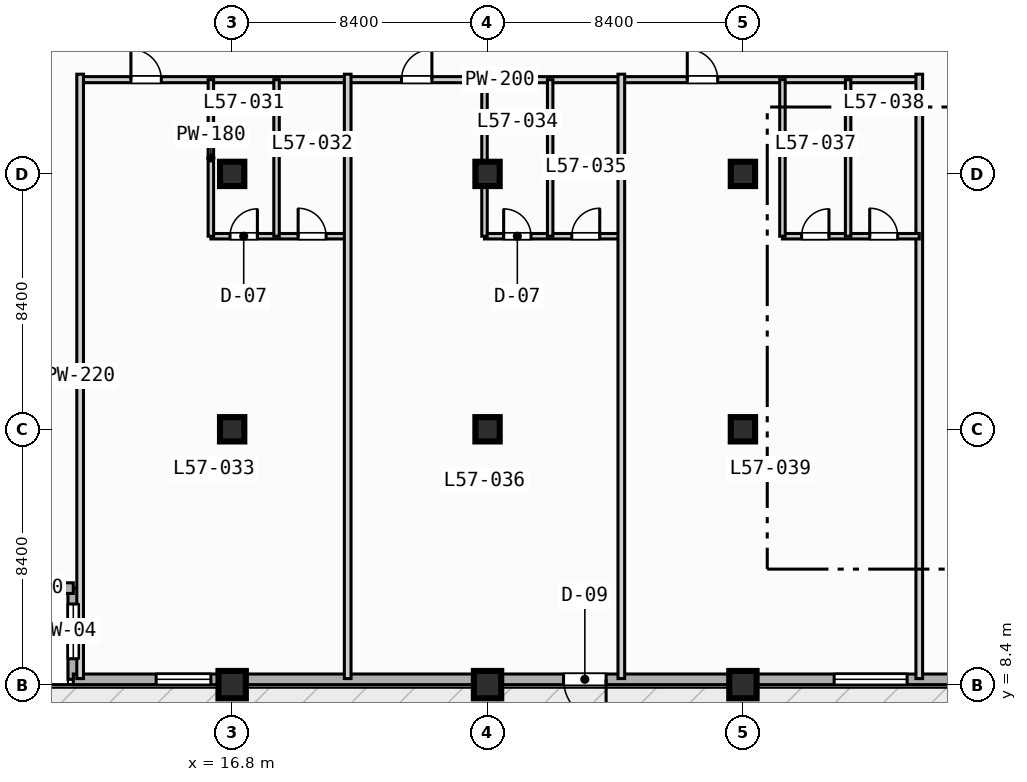
"""IFC4 building model, lengths in metres.
Left out: names, types, materials, properties, quantities, classifications, styles, units other than length and angle.
Written with IfcOpenShell. Run it as: python <this file> out.ifc"""

import sys

from ifc_helpers import new_model, si_unit, direction, frame, frame_2d, origin, origin_2d, place, context, subcontext, project, spatial, rectangle, extrude, element, fill, save


model = new_model("IFC4")
c1 = context("Model", 3, precision=1e-05, world=origin(), true_north=direction((0.0, 1.0)))
c2 = subcontext(c1, "Body", "Model", "MODEL_VIEW")
j1 = project(units=[si_unit("LENGTHUNIT", "METRE"), si_unit("PLANEANGLEUNIT", "RADIAN")], contexts=[c1])
p1 = place(None, origin())
s1 = spatial("IfcSite", under=j1, at=p1, CompositionType="ELEMENT")
p2 = place(p1, origin())
s2 = spatial("IfcBuilding", under=s1, at=p2, CompositionType="ELEMENT")
p3 = place(p2, frame((0.0, 0.0, 234.2)))
s3 = spatial("IfcBuildingStorey", under=s2, at=p3, CompositionType="ELEMENT", Elevation=234.2)
p4 = place(p3, frame((16.8, 8.4, 0.0), z_axis=(0.0, 0.0, 1.0), x_axis=(1.0, 0.0, 0.0)))
e1 = element("IfcColumn", 1, at=p4, inside=s3, PredefinedType="COLUMN", context=c2, shape_type="SweptSolid", body=[
    extrude(rectangle(XDim=0.9, YDim=0.9, at=origin_2d()), origin(), (0.0, 0.0, 1.0), 3.7),
])
for number, where, z_axis, x_axis in (
    (2, (16.8, 16.8, 0.0), (0.0, 0.0, 1.0), (1.0, 0.0, 0.0)),
    (3, (16.8, 25.2, 0.0), (0.0, 0.0, 1.0), (1.0, 0.0, 0.0)),
):
    element("IfcColumn", number, at=place(p3, frame(where, z_axis=z_axis, x_axis=x_axis)), inside=s3, PredefinedType="COLUMN", context=c2, shape_type="SweptSolid", body=[
        extrude(rectangle(XDim=0.8, YDim=0.8, at=origin_2d()), origin(), (0.0, 0.0, 1.0), 3.7),
    ])
p5 = place(p3, frame((25.2, 8.4, 0.0), z_axis=(0.0, 0.0, 1.0), x_axis=(1.0, 0.0, 0.0)))
e4 = element("IfcColumn", 4, at=p5, inside=s3, PredefinedType="COLUMN", context=c2, shape_type="SweptSolid", body=[
    extrude(rectangle(XDim=0.9, YDim=0.9, at=origin_2d()), origin(), (0.0, 0.0, 1.0), 3.7),
])
for number, where, z_axis, x_axis in (
    (5, (25.2, 16.8, 0.0), (0.0, 0.0, 1.0), (1.0, 0.0, 0.0)),
    (6, (25.2, 25.2, 0.0), (0.0, 0.0, 1.0), (1.0, 0.0, 0.0)),
):
    element("IfcColumn", number, at=place(p3, frame(where, z_axis=z_axis, x_axis=x_axis)), inside=s3, PredefinedType="COLUMN", context=c2, shape_type="SweptSolid", body=[
        extrude(rectangle(XDim=0.8, YDim=0.8, at=origin_2d()), origin(), (0.0, 0.0, 1.0), 3.7),
    ])
p6 = place(p3, frame((33.6, 8.4, 0.0), z_axis=(0.0, 0.0, 1.0), x_axis=(1.0, 0.0, 0.0)))
e7 = element("IfcColumn", 7, at=p6, inside=s3, PredefinedType="COLUMN", context=c2, shape_type="SweptSolid", body=[
    extrude(rectangle(XDim=0.9, YDim=0.9, at=origin_2d()), origin(), (0.0, 0.0, 1.0), 3.7),
])
for number, where, z_axis, x_axis in (
    (8, (33.6, 16.8, 0.0), (0.0, 0.0, 1.0), (1.0, 0.0, 0.0)),
    (9, (33.6, 25.2, 0.0), (0.0, 0.0, 1.0), (1.0, 0.0, 0.0)),
):
    element("IfcColumn", number, at=place(p3, frame(where, z_axis=z_axis, x_axis=x_axis)), inside=s3, PredefinedType="COLUMN", context=c2, shape_type="SweptSolid", body=[
        extrude(rectangle(XDim=0.8, YDim=0.8, at=origin_2d()), origin(), (0.0, 0.0, 1.0), 3.7),
    ])
p7 = place(p3, frame((11.575, 8.575, 0.0), z_axis=(0.0, 0.0, 1.0), x_axis=(0.0, 1.0, 0.0)))
e10 = element("IfcWall", 10, at=p7, inside=s3, PredefinedType="STANDARD", context=c2, shape_type="SweptSolid", body=[
    extrude(rectangle(XDim=3.0, YDim=0.35, at=frame_2d((1.5, 0.0))), origin(), (0.0, 0.0, 1.0), 3.47),
])
p8 = place(p7, frame((0.677, 0.0, 0.85)))
e11 = element("IfcOpeningElement", 11, at=p8, cuts=e10, PredefinedType="OPENING", context=c2, shape_type="SweptSolid", body=[
    extrude(rectangle(XDim=1.8, YDim=1.8, at=frame_2d((0.9, 0.9))), frame((0.0, 0.185, 0.0), z_axis=(0.0, -1.0, 0.0), x_axis=(1.0, 0.0, 0.0)), (0.0, 0.0, 1.0), 0.37),
])
p9 = place(p3, frame((11.575, 11.575, 0.0), z_axis=(0.0, 0.0, 1.0), x_axis=(-1.0, 0.0, 0.0)))
e12 = element("IfcWall", 12, at=p9, inside=s3, PredefinedType="STANDARD", context=c2, shape_type="SweptSolid", body=[
    extrude(rectangle(XDim=3.0, YDim=0.35, at=frame_2d((1.5, 0.0))), origin(), (0.0, 0.0, 1.0), 3.47),
])
p10 = place(p3, frame((72.425, 8.575, 0.0), z_axis=(0.0, 0.0, 1.0), x_axis=(-1.0, 0.0, 0.0)))
e13 = element("IfcWall", 13, at=p10, inside=s3, PredefinedType="STANDARD", context=c2, shape_type="SweptSolid", body=[
    extrude(rectangle(XDim=60.85, YDim=0.35, at=frame_2d((30.425, 0.0))), origin(), (0.0, 0.0, 1.0), 3.47),
])
p11 = place(p10, frame((43.325, 0.0, 0.0)))
e14 = element("IfcOpeningElement", 14, at=p11, cuts=e13, PredefinedType="OPENING", context=c2, shape_type="SweptSolid", body=[
    extrude(rectangle(XDim=1.4, YDim=2.2, at=frame_2d((0.7, 1.1))), frame((0.0, 0.185, 0.0), z_axis=(0.0, -1.0, 0.0), x_axis=(1.0, 0.0, 0.0)), (0.0, 0.0, 1.0), 0.37),
])
p12 = place(p10, frame((33.425, 0.0, 0.85)))
e15 = element("IfcOpeningElement", 15, at=p12, cuts=e13, PredefinedType="OPENING", context=c2, shape_type="SweptSolid", body=[
    extrude(rectangle(XDim=2.4, YDim=1.95, at=frame_2d((1.2, 0.975))), frame((0.0, 0.185, 0.0), z_axis=(0.0, -1.0, 0.0), x_axis=(1.0, 0.0, 0.0)), (0.0, 0.0, 1.0), 0.37),
])
p13 = place(p10, frame((25.325, 0.0, 0.85)))
e16 = element("IfcOpeningElement", 16, at=p13, cuts=e13, PredefinedType="OPENING", context=c2, shape_type="SweptSolid", body=[
    extrude(rectangle(XDim=1.8, YDim=1.8, at=frame_2d((0.9, 0.9))), frame((0.0, 0.185, 0.0), z_axis=(0.0, -1.0, 0.0), x_axis=(1.0, 0.0, 0.0)), (0.0, 0.0, 1.0), 0.37),
])
p14 = place(p10, frame((56.325, 0.0, 0.85)))
e17 = element("IfcOpeningElement", 17, at=p14, cuts=e13, PredefinedType="OPENING", context=c2, shape_type="SweptSolid", body=[
    extrude(rectangle(XDim=1.8, YDim=1.8, at=frame_2d((0.9, 0.9))), frame((0.0, 0.185, 0.0), z_axis=(0.0, -1.0, 0.0), x_axis=(1.0, 0.0, 0.0)), (0.0, 0.0, 1.0), 0.37),
])
p15 = place(p3, frame((11.8, 28.3, 0.0), z_axis=(0.0, 0.0, 1.0), x_axis=(1.0, 0.0, 0.0)))
e18 = element("IfcWall", 18, at=p15, inside=s3, PredefinedType="PARTITIONING", context=c2, shape_type="SweptSolid", body=[
    extrude(rectangle(XDim=27.6, YDim=0.2, at=frame_2d((13.8, 0.0))), origin(), (0.0, 0.0, 1.0), 3.47),
])
p16 = place(p15, frame((1.67, 0.0, 0.0)))
e19 = element("IfcOpeningElement", 19, at=p16, cuts=e18, PredefinedType="OPENING", context=c2, shape_type="SweptSolid", body=[
    extrude(rectangle(XDim=1.0, YDim=2.15, at=frame_2d((0.5, 1.075))), frame((0.0, 0.11, 0.0), z_axis=(0.0, -1.0, 0.0), x_axis=(1.0, 0.0, 0.0)), (0.0, 0.0, 1.0), 0.22),
])
p17 = place(p15, frame((10.57, 0.0, 0.0)))
e20 = element("IfcOpeningElement", 20, at=p17, cuts=e18, PredefinedType="OPENING", context=c2, shape_type="SweptSolid", body=[
    extrude(rectangle(XDim=1.0, YDim=2.15, at=frame_2d((0.5, 1.075))), frame((0.0, 0.11, 0.0), z_axis=(0.0, -1.0, 0.0), x_axis=(1.0, 0.0, 0.0)), (0.0, 0.0, 1.0), 0.22),
])
p18 = place(p15, frame((19.97, 0.0, 0.0)))
e21 = element("IfcOpeningElement", 21, at=p18, cuts=e18, PredefinedType="OPENING", context=c2, shape_type="SweptSolid", body=[
    extrude(rectangle(XDim=1.0, YDim=2.15, at=frame_2d((0.5, 1.075))), frame((0.0, 0.11, 0.0), z_axis=(0.0, -1.0, 0.0), x_axis=(1.0, 0.0, 0.0)), (0.0, 0.0, 1.0), 0.22),
])
p19 = place(p3, frame((11.8, 8.6, 0.0), z_axis=(0.0, 0.0, 1.0), x_axis=(0.0, 1.0, 0.0)))
e22 = element("IfcWall", 22, at=p19, inside=s3, PredefinedType="PARTITIONING", context=c2, shape_type="SweptSolid", body=[
    extrude(rectangle(XDim=19.88, YDim=0.22, at=frame_2d((9.94, 0.0))), origin(), (0.0, 0.0, 1.0), 3.47),
])
p20 = place(p3, frame((16.1, 23.15, 0.0), z_axis=(0.0, 0.0, 1.0), x_axis=(1.0, 0.0, 0.0)))
e23 = element("IfcWall", 23, at=p20, inside=s3, PredefinedType="PLUMBINGWALL", context=c2, shape_type="SweptSolid", body=[
    extrude(rectangle(XDim=4.5, YDim=0.18, at=frame_2d((2.25, 0.0))), origin(), (0.0, 0.0, 1.0), 3.47),
])
p21 = place(p20, frame((0.63, 0.0, 0.0)))
e24 = element("IfcOpeningElement", 24, at=p21, cuts=e23, PredefinedType="OPENING", context=c2, shape_type="SweptSolid", body=[
    extrude(rectangle(XDim=0.9, YDim=2.1, at=frame_2d((0.45, 1.05))), frame((0.0, 0.1, 0.0), z_axis=(0.0, -1.0, 0.0), x_axis=(1.0, 0.0, 0.0)), (0.0, 0.0, 1.0), 0.2),
])
p22 = place(p20, frame((2.87, 0.0, 0.0)))
e25 = element("IfcOpeningElement", 25, at=p22, cuts=e23, PredefinedType="OPENING", context=c2, shape_type="SweptSolid", body=[
    extrude(rectangle(XDim=0.92, YDim=2.1, at=frame_2d((0.46, 1.05))), frame((0.0, 0.1, 0.0), z_axis=(0.0, -1.0, 0.0), x_axis=(1.0, 0.0, 0.0)), (0.0, 0.0, 1.0), 0.2),
])
for number, where, z_axis, x_axis in (
    (26, (16.1, 23.15, 0.0), (0.0, 0.0, 1.0), (0.0, 1.0, 0.0)),
    (27, (18.26, 23.15, 0.0), (0.0, 0.0, 1.0), (0.0, 1.0, 0.0)),
):
    element("IfcWall", number, at=place(p3, frame(where, z_axis=z_axis, x_axis=x_axis)), inside=s3, PredefinedType="PLUMBINGWALL", context=c2, shape_type="SweptSolid", body=[
        extrude(rectangle(XDim=5.15, YDim=0.18, at=frame_2d((2.575, 0.0))), origin(), (0.0, 0.0, 1.0), 3.47),
    ])
p23 = place(p3, frame((20.6, 8.6, 0.0), z_axis=(0.0, 0.0, 1.0), x_axis=(0.0, 1.0, 0.0)))
e28 = element("IfcWall", 28, at=p23, inside=s3, PredefinedType="PARTITIONING", context=c2, shape_type="SweptSolid", body=[
    extrude(rectangle(XDim=19.88, YDim=0.22, at=frame_2d((9.94, 0.0))), origin(), (0.0, 0.0, 1.0), 3.47),
])
p24 = place(p3, frame((25.1, 23.15, 0.0), z_axis=(0.0, 0.0, 1.0), x_axis=(1.0, 0.0, 0.0)))
e29 = element("IfcWall", 29, at=p24, inside=s3, PredefinedType="PLUMBINGWALL", context=c2, shape_type="SweptSolid", body=[
    extrude(rectangle(XDim=4.5, YDim=0.18, at=frame_2d((2.25, 0.0))), origin(), (0.0, 0.0, 1.0), 3.47),
])
p25 = place(p24, frame((0.63, 0.0, 0.0)))
e30 = element("IfcOpeningElement", 30, at=p25, cuts=e29, PredefinedType="OPENING", context=c2, shape_type="SweptSolid", body=[
    extrude(rectangle(XDim=0.9, YDim=2.1, at=frame_2d((0.45, 1.05))), frame((0.0, 0.1, 0.0), z_axis=(0.0, -1.0, 0.0), x_axis=(1.0, 0.0, 0.0)), (0.0, 0.0, 1.0), 0.2),
])
p26 = place(p24, frame((2.87, 0.0, 0.0)))
e31 = element("IfcOpeningElement", 31, at=p26, cuts=e29, PredefinedType="OPENING", context=c2, shape_type="SweptSolid", body=[
    extrude(rectangle(XDim=0.92, YDim=2.1, at=frame_2d((0.46, 1.05))), frame((0.0, 0.1, 0.0), z_axis=(0.0, -1.0, 0.0), x_axis=(1.0, 0.0, 0.0)), (0.0, 0.0, 1.0), 0.2),
])
p27 = place(p3, frame((25.1, 23.15, 0.0), z_axis=(0.0, 0.0, 1.0), x_axis=(0.0, 1.0, 0.0)))
e32 = element("IfcWall", 32, at=p27, inside=s3, PredefinedType="PLUMBINGWALL", context=c2, shape_type="SweptSolid", body=[
    extrude(rectangle(XDim=5.15, YDim=0.18, at=frame_2d((2.575, 0.0))), origin(), (0.0, 0.0, 1.0), 2.82),
])
p28 = place(p3, frame((27.26, 23.15, 0.0), z_axis=(0.0, 0.0, 1.0), x_axis=(0.0, 1.0, 0.0)))
e33 = element("IfcWall", 33, at=p28, inside=s3, PredefinedType="PLUMBINGWALL", context=c2, shape_type="SweptSolid", body=[
    extrude(rectangle(XDim=5.15, YDim=0.18, at=frame_2d((2.575, 0.0))), origin(), (0.0, 0.0, 1.0), 3.47),
])
for number, where, z_axis, x_axis in (
    (34, (29.6, 8.6, 0.0), (0.0, 0.0, 1.0), (0.0, 1.0, 0.0)),
    (35, (39.4, 8.6, 0.0), (0.0, 0.0, 1.0), (0.0, 1.0, 0.0)),
):
    element("IfcWall", number, at=place(p3, frame(where, z_axis=z_axis, x_axis=x_axis)), inside=s3, PredefinedType="PARTITIONING", context=c2, shape_type="SweptSolid", body=[
        extrude(rectangle(XDim=19.88, YDim=0.22, at=frame_2d((9.94, 0.0))), origin(), (0.0, 0.0, 1.0), 3.47),
    ])
p29 = place(p3, frame((34.9, 23.15, 0.0), z_axis=(0.0, 0.0, 1.0), x_axis=(1.0, 0.0, 0.0)))
e36 = element("IfcWall", 36, at=p29, inside=s3, PredefinedType="PLUMBINGWALL", context=c2, shape_type="SweptSolid", body=[
    extrude(rectangle(XDim=4.5, YDim=0.18, at=frame_2d((2.25, 0.0))), origin(), (0.0, 0.0, 1.0), 3.47),
])
p30 = place(p29, frame((0.63, 0.0, 0.0)))
e37 = element("IfcOpeningElement", 37, at=p30, cuts=e36, PredefinedType="OPENING", context=c2, shape_type="SweptSolid", body=[
    extrude(rectangle(XDim=0.9, YDim=2.1, at=frame_2d((0.45, 1.05))), frame((0.0, 0.1, 0.0), z_axis=(0.0, -1.0, 0.0), x_axis=(1.0, 0.0, 0.0)), (0.0, 0.0, 1.0), 0.2),
])
p31 = place(p29, frame((2.87, 0.0, 0.0)))
e38 = element("IfcOpeningElement", 38, at=p31, cuts=e36, PredefinedType="OPENING", context=c2, shape_type="SweptSolid", body=[
    extrude(rectangle(XDim=0.92, YDim=2.1, at=frame_2d((0.46, 1.05))), frame((0.0, 0.1, 0.0), z_axis=(0.0, -1.0, 0.0), x_axis=(1.0, 0.0, 0.0)), (0.0, 0.0, 1.0), 0.2),
])
for number, where, z_axis, x_axis in (
    (39, (34.9, 23.15, 0.0), (0.0, 0.0, 1.0), (0.0, 1.0, 0.0)),
    (40, (37.06, 23.15, 0.0), (0.0, 0.0, 1.0), (0.0, 1.0, 0.0)),
):
    element("IfcWall", number, at=place(p3, frame(where, z_axis=z_axis, x_axis=x_axis)), inside=s3, PredefinedType="PLUMBINGWALL", context=c2, shape_type="SweptSolid", body=[
        extrude(rectangle(XDim=5.15, YDim=0.18, at=frame_2d((2.575, 0.0))), origin(), (0.0, 0.0, 1.0), 3.47),
    ])
p32 = place(p8, origin())
e41 = element("IfcWindow", 41, at=p32, inside=s3, PartitioningType="SINGLE_PANEL", PredefinedType="WINDOW", context=c2, shape_type="SweptSolid", body=[
    extrude(rectangle(XDim=1.8, YDim=1.8, at=frame_2d((0.9, 0.9))), frame((0.0, 0.03, 0.0), z_axis=(0.0, -1.0, 0.0), x_axis=(1.0, 0.0, 0.0)), (0.0, 0.0, 1.0), 0.06),
])
fill(e11, e41)
p33 = place(p11, origin())
e42 = element("IfcDoor", 42, at=p33, inside=s3, OperationType="SINGLE_SWING_LEFT", PredefinedType="DOOR", context=c2, shape_type="SweptSolid", body=[
    extrude(rectangle(XDim=1.4, YDim=2.2, at=frame_2d((0.7, 1.1))), frame((0.0, 0.025, 0.0), z_axis=(0.0, -1.0, 0.0), x_axis=(1.0, 0.0, 0.0)), (0.0, 0.0, 1.0), 0.05),
])
fill(e14, e42)
p34 = place(p12, origin())
e43 = element("IfcWindow", 43, at=p34, inside=s3, PartitioningType="SINGLE_PANEL", PredefinedType="WINDOW", context=c2, shape_type="SweptSolid", body=[
    extrude(rectangle(XDim=2.4, YDim=1.95, at=frame_2d((1.2, 0.975))), frame((0.0, 0.03, 0.0), z_axis=(0.0, -1.0, 0.0), x_axis=(1.0, 0.0, 0.0)), (0.0, 0.0, 1.0), 0.06),
])
fill(e15, e43)
p35 = place(p14, origin())
e44 = element("IfcWindow", 44, at=p35, inside=s3, PartitioningType="SINGLE_PANEL", PredefinedType="WINDOW", context=c2, shape_type="SweptSolid", body=[
    extrude(rectangle(XDim=1.8, YDim=1.8, at=frame_2d((0.9, 0.9))), frame((0.0, 0.03, 0.0), z_axis=(0.0, -1.0, 0.0), x_axis=(1.0, 0.0, 0.0)), (0.0, 0.0, 1.0), 0.06),
])
fill(e17, e44)
p36 = place(p16, origin())
e45 = element("IfcDoor", 45, at=p36, inside=s3, OperationType="SINGLE_SWING_LEFT", PredefinedType="DOOR", context=c2, shape_type="SweptSolid", body=[
    extrude(rectangle(XDim=1.0, YDim=2.15, at=frame_2d((0.5, 1.075))), frame((0.0, 0.025, 0.0), z_axis=(0.0, -1.0, 0.0), x_axis=(1.0, 0.0, 0.0)), (0.0, 0.0, 1.0), 0.05),
])
fill(e19, e45)
p37 = place(p17, origin())
e46 = element("IfcDoor", 46, at=p37, inside=s3, OperationType="SINGLE_SWING_RIGHT", PredefinedType="DOOR", context=c2, shape_type="SweptSolid", body=[
    extrude(rectangle(XDim=1.0, YDim=2.15, at=frame_2d((0.5, 1.075))), frame((0.0, 0.025, 0.0), z_axis=(0.0, -1.0, 0.0), x_axis=(1.0, 0.0, 0.0)), (0.0, 0.0, 1.0), 0.05),
])
fill(e20, e46)
p38 = place(p18, origin())
e47 = element("IfcDoor", 47, at=p38, inside=s3, OperationType="SINGLE_SWING_LEFT", PredefinedType="DOOR", context=c2, shape_type="SweptSolid", body=[
    extrude(rectangle(XDim=1.0, YDim=2.15, at=frame_2d((0.5, 1.075))), frame((0.0, 0.025, 0.0), z_axis=(0.0, -1.0, 0.0), x_axis=(1.0, 0.0, 0.0)), (0.0, 0.0, 1.0), 0.05),
])
fill(e21, e47)
p39 = place(p21, origin())
e48 = element("IfcDoor", 48, at=p39, inside=s3, OperationType="SINGLE_SWING_RIGHT", PredefinedType="DOOR", context=c2, shape_type="SweptSolid", body=[
    extrude(rectangle(XDim=0.9, YDim=2.1, at=frame_2d((0.45, 1.05))), frame((0.0, 0.025, 0.0), z_axis=(0.0, -1.0, 0.0), x_axis=(1.0, 0.0, 0.0)), (0.0, 0.0, 1.0), 0.05),
])
fill(e24, e48)
p40 = place(p22, origin())
e49 = element("IfcDoor", 49, at=p40, inside=s3, OperationType="SINGLE_SWING_LEFT", PredefinedType="DOOR", context=c2, shape_type="SweptSolid", body=[
    extrude(rectangle(XDim=0.92, YDim=2.1, at=frame_2d((0.46, 1.05))), frame((0.0, 0.025, 0.0), z_axis=(0.0, -1.0, 0.0), x_axis=(1.0, 0.0, 0.0)), (0.0, 0.0, 1.0), 0.05),
])
fill(e25, e49)
p41 = place(p25, origin())
e50 = element("IfcDoor", 50, at=p41, inside=s3, OperationType="SINGLE_SWING_LEFT", PredefinedType="DOOR", context=c2, shape_type="SweptSolid", body=[
    extrude(rectangle(XDim=0.9, YDim=2.1, at=frame_2d((0.45, 1.05))), frame((0.0, 0.025, 0.0), z_axis=(0.0, -1.0, 0.0), x_axis=(1.0, 0.0, 0.0)), (0.0, 0.0, 1.0), 0.05),
])
fill(e30, e50)
p42 = place(p26, origin())
e51 = element("IfcDoor", 51, at=p42, inside=s3, OperationType="SINGLE_SWING_RIGHT", PredefinedType="DOOR", context=c2, shape_type="SweptSolid", body=[
    extrude(rectangle(XDim=0.92, YDim=2.1, at=frame_2d((0.46, 1.05))), frame((0.0, 0.025, 0.0), z_axis=(0.0, -1.0, 0.0), x_axis=(1.0, 0.0, 0.0)), (0.0, 0.0, 1.0), 0.05),
])
fill(e31, e51)
p43 = place(p30, origin())
e52 = element("IfcDoor", 52, at=p43, inside=s3, OperationType="SINGLE_SWING_RIGHT", PredefinedType="DOOR", context=c2, shape_type="SweptSolid", body=[
    extrude(rectangle(XDim=0.9, YDim=2.1, at=frame_2d((0.45, 1.05))), frame((0.0, 0.025, 0.0), z_axis=(0.0, -1.0, 0.0), x_axis=(1.0, 0.0, 0.0)), (0.0, 0.0, 1.0), 0.05),
])
fill(e37, e52)
p44 = place(p31, origin())
e53 = element("IfcDoor", 53, at=p44, inside=s3, OperationType="SINGLE_SWING_LEFT", PredefinedType="DOOR", context=c2, shape_type="SweptSolid", body=[
    extrude(rectangle(XDim=0.92, YDim=2.1, at=frame_2d((0.46, 1.05))), frame((0.0, 0.025, 0.0), z_axis=(0.0, -1.0, 0.0), x_axis=(1.0, 0.0, 0.0)), (0.0, 0.0, 1.0), 0.05),
])
fill(e38, e53)
save(model, sys.argv[1])
